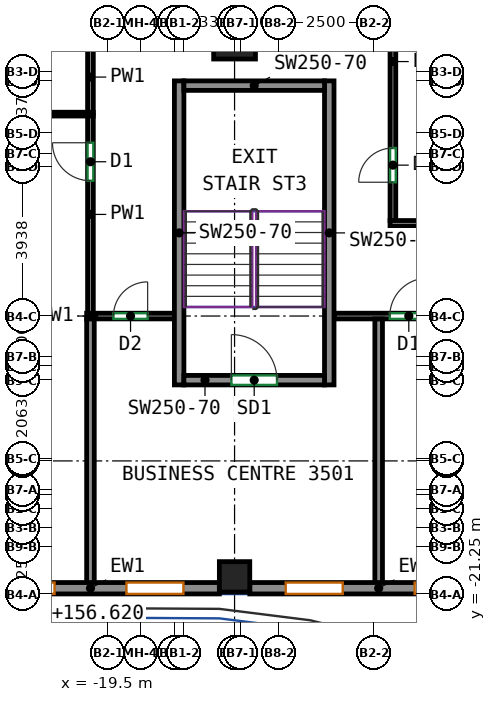
"""IFC4 building model, lengths in metres.
Left out: names, types, materials, properties, quantities, classifications, styles, units other than length and angle.
Written with IfcOpenShell. Run it as: python <this file> out.ifc"""

import sys

from ifc_helpers import new_model, si_unit, direction, frame, frame_2d, origin, origin_2d, place, context, subcontext, project, spatial, rectangle, extrude, source, transform, mapped, element, fill, save


model = new_model("IFC4")
c1 = context("Model", 3, precision=1e-05, world=origin(), true_north=direction((0.0, 1.0)))
c2 = subcontext(c1, "Body", "Model", "MODEL_VIEW")
j1 = project(units=[si_unit("LENGTHUNIT", "METRE"), si_unit("PLANEANGLEUNIT", "RADIAN")], contexts=[c1])
p1 = place(None, origin())
s1 = spatial("IfcSite", under=j1, at=p1, CompositionType="ELEMENT")
p2 = place(p1, origin())
s2 = spatial("IfcBuilding", under=s1, at=p2, CompositionType="ELEMENT")
p3 = place(p2, frame((0.0, 0.0, 154.1)))
s3 = spatial("IfcBuildingStorey", under=s2, at=p3, CompositionType="ELEMENT", Elevation=154.1)
m1 = source(origin(), c2, "Body", "SweptSolid", [
    extrude(rectangle(XDim=0.8, YDim=0.8, at=origin_2d()), origin(), (0.0, 0.0, 1.0), 3.12),
])
p4 = place(p3, frame((-16.167, -20.8, 0.0), z_axis=(0.0, 0.0, 1.0), x_axis=(1.0, 0.0, 0.0)))
e1 = element("IfcColumn", 1, at=p4, inside=s3, PredefinedType="COLUMN", context=c2, shape_type="MappedRepresentation", body=[
    mapped(m1, transform((0.0, 0.0, 0.0))),
])
m2 = source(origin(), c2, "Body", "SweptSolid", [
    extrude(rectangle(XDim=1.1, YDim=1.1, at=origin_2d()), origin(), (0.0, 0.0, 1.0), 3.12),
])
p5 = place(p3, frame((-16.167, -6.625, 0.0), z_axis=(0.0, 0.0, 1.0), x_axis=(1.0, 0.0, 0.0)))
e2 = element("IfcColumn", 2, at=p5, inside=s3, PredefinedType="COLUMN", context=c2, shape_type="MappedRepresentation", body=[
    mapped(m2, transform((0.0, 0.0, 0.0))),
])
m3 = source(origin(), c2, "Body", "SweptSolid", [
    extrude(rectangle(XDim=8.0, YDim=0.25, at=frame_2d((4.0, 0.0))), origin(), (0.0, 0.0, 1.0), 3.12),
])
for number, where, z_axis, x_axis in (
    (3, (-17.625, -15.75, 0.0), (0.0, 0.0, 1.0), (0.0, 1.0, 0.0)),
    (4, (-13.675, -15.75, 0.0), (0.0, 0.0, 1.0), (0.0, 1.0, 0.0)),
):
    element("IfcWall", number, at=place(p3, frame(where, z_axis=z_axis, x_axis=x_axis)), inside=s3, PredefinedType="SHEAR", context=c2, shape_type="MappedRepresentation", body=[
        mapped(m3, transform((0.0, 0.0, 0.0))),
    ])
m4 = source(origin(), c2, "Body", "SweptSolid", [
    extrude(rectangle(XDim=3.7, YDim=0.25, at=frame_2d((1.85, 0.0))), origin(), (0.0, 0.0, 1.0), 3.12),
])
p6 = place(p3, frame((-17.5, -15.625, 0.0), z_axis=(0.0, 0.0, 1.0), x_axis=(1.0, 0.0, 0.0)))
e5 = element("IfcWall", 5, at=p6, inside=s3, PredefinedType="SHEAR", context=c2, shape_type="MappedRepresentation", body=[
    mapped(m4, transform((0.0, 0.0, 0.0))),
])
p7 = place(p6, frame((1.25, 0.0, 0.0)))
e6 = element("IfcOpeningElement", 6, at=p7, cuts=e5, PredefinedType="OPENING", context=c2, shape_type="SweptSolid", body=[
    extrude(rectangle(XDim=1.2, YDim=2.1, at=frame_2d((0.6, 1.05))), frame((0.0, 0.135, 0.0), z_axis=(0.0, -1.0, 0.0), x_axis=(1.0, 0.0, 0.0)), (0.0, 0.0, 1.0), 0.27),
])
p8 = place(p3, frame((-17.5, -7.875, 0.0), z_axis=(0.0, 0.0, 1.0), x_axis=(1.0, 0.0, 0.0)))
e7 = element("IfcWall", 7, at=p8, inside=s3, PredefinedType="SHEAR", context=c2, shape_type="MappedRepresentation", body=[
    mapped(m4, transform((0.0, 0.0, 0.0))),
])
m5 = source(origin(), c2, "Body", "SweptSolid", [
    extrude(rectangle(XDim=6.783, YDim=0.3, at=frame_2d((3.392, 0.0))), origin(), (0.0, 0.0, 1.0), 3.12),
])
p9 = place(p3, frame((-23.35, -21.1, 0.0), z_axis=(0.0, 0.0, 1.0), x_axis=(1.0, 0.0, 0.0)))
e8 = element("IfcWall", 8, at=p9, inside=s3, PredefinedType="SOLIDWALL", context=c2, shape_type="MappedRepresentation", body=[
    mapped(m5, transform((0.0, 0.0, 0.0))),
])
p10 = place(p9, frame((0.946, 0.0, 0.85)))
e9 = element("IfcOpeningElement", 9, at=p10, cuts=e8, PredefinedType="OPENING", context=c2, shape_type="SweptSolid", body=[
    extrude(rectangle(XDim=1.5, YDim=1.95, at=frame_2d((0.75, 0.975))), frame((0.0, 0.16, 0.0), z_axis=(0.0, -1.0, 0.0), x_axis=(1.0, 0.0, 0.0)), (0.0, 0.0, 1.0), 0.32),
])
p11 = place(p9, frame((4.337, 0.0, 0.85)))
e10 = element("IfcOpeningElement", 10, at=p11, cuts=e8, PredefinedType="OPENING", context=c2, shape_type="SweptSolid", body=[
    extrude(rectangle(XDim=1.5, YDim=1.95, at=frame_2d((0.75, 0.975))), frame((0.0, 0.16, 0.0), z_axis=(0.0, -1.0, 0.0), x_axis=(1.0, 0.0, 0.0)), (0.0, 0.0, 1.0), 0.32),
])
m6 = source(origin(), c2, "Body", "SweptSolid", [
    extrude(rectangle(XDim=6.783, YDim=0.3, at=frame_2d((3.392, 0.0))), origin(), (0.0, 0.0, 1.0), 3.12),
])
p12 = place(p3, frame((-15.767, -21.1, 0.0), z_axis=(0.0, 0.0, 1.0), x_axis=(1.0, 0.0, 0.0)))
e11 = element("IfcWall", 11, at=p12, inside=s3, PredefinedType="SOLIDWALL", context=c2, shape_type="MappedRepresentation", body=[
    mapped(m6, transform((0.0, 0.0, 0.0))),
])
p13 = place(p12, frame((0.946, 0.0, 0.85)))
e12 = element("IfcOpeningElement", 12, at=p13, cuts=e11, PredefinedType="OPENING", context=c2, shape_type="SweptSolid", body=[
    extrude(rectangle(XDim=1.5, YDim=1.95, at=frame_2d((0.75, 0.975))), frame((0.0, 0.16, 0.0), z_axis=(0.0, -1.0, 0.0), x_axis=(1.0, 0.0, 0.0)), (0.0, 0.0, 1.0), 0.32),
])
p14 = place(p12, frame((4.338, 0.0, 0.85)))
e13 = element("IfcOpeningElement", 13, at=p14, cuts=e11, PredefinedType="OPENING", context=c2, shape_type="SweptSolid", body=[
    extrude(rectangle(XDim=1.5, YDim=1.95, at=frame_2d((0.75, 0.975))), frame((0.0, 0.16, 0.0), z_axis=(0.0, -1.0, 0.0), x_axis=(1.0, 0.0, 0.0)), (0.0, 0.0, 1.0), 0.32),
])
p15 = place(p3, frame((-13.55, -13.938, 0.0), z_axis=(0.0, 0.0, 1.0), x_axis=(1.0, 0.0, 0.0)))
e14 = element("IfcWall", 14, at=p15, inside=s3, PredefinedType="PARTITIONING", context=c2, shape_type="SweptSolid", body=[
    extrude(rectangle(XDim=4.417, YDim=0.15, at=frame_2d((2.208, 0.0))), origin(), (0.0, 0.0, 1.0), 3.12),
])
p16 = place(p15, frame((1.468, 0.0, 0.0)))
e15 = element("IfcOpeningElement", 15, at=p16, cuts=e14, PredefinedType="OPENING", context=c2, shape_type="SweptSolid", body=[
    extrude(rectangle(XDim=1.0, YDim=2.1, at=frame_2d((0.5, 1.05))), frame((0.0, 0.085, 0.0), z_axis=(0.0, -1.0, 0.0), x_axis=(1.0, 0.0, 0.0)), (0.0, 0.0, 1.0), 0.17),
])
p17 = place(p3, frame((-20.059, -13.938, 0.0), z_axis=(0.0, 0.0, 1.0), x_axis=(1.0, 0.0, 0.0)))
e16 = element("IfcWall", 16, at=p17, inside=s3, PredefinedType="PARTITIONING", context=c2, shape_type="SweptSolid", body=[
    extrude(rectangle(XDim=2.309, YDim=0.15, at=frame_2d((1.155, 0.0))), origin(), (0.0, 0.0, 1.0), 3.12),
])
p18 = place(p17, frame((0.705, 0.0, 0.0)))
e17 = element("IfcOpeningElement", 17, at=p18, cuts=e16, PredefinedType="OPENING", context=c2, shape_type="SweptSolid", body=[
    extrude(rectangle(XDim=0.9, YDim=2.1, at=frame_2d((0.45, 1.05))), frame((0.0, 0.085, 0.0), z_axis=(0.0, -1.0, 0.0), x_axis=(1.0, 0.0, 0.0)), (0.0, 0.0, 1.0), 0.17),
])
p19 = place(p3, frame((-19.959, -13.863, 0.0), z_axis=(0.0, 0.0, 1.0), x_axis=(0.0, 1.0, 0.0)))
e18 = element("IfcWall", 18, at=p19, inside=s3, PredefinedType="PARTITIONING", context=c2, shape_type="SweptSolid", body=[
    extrude(rectangle(XDim=5.198, YDim=0.15, at=frame_2d((2.599, 0.0))), origin(), (0.0, 0.0, 1.0), 3.12),
])
p20 = place(p19, frame((3.485, 0.0, 0.0)))
e19 = element("IfcOpeningElement", 19, at=p20, cuts=e18, PredefinedType="OPENING", context=c2, shape_type="SweptSolid", body=[
    extrude(rectangle(XDim=1.0, YDim=2.1, at=frame_2d((0.5, 1.05))), frame((0.0, 0.085, 0.0), z_axis=(0.0, -1.0, 0.0), x_axis=(1.0, 0.0, 0.0)), (0.0, 0.0, 1.0), 0.17),
])
p21 = place(p3, frame((-19.959, -8.585, 0.0), z_axis=(0.0, 0.0, 1.0), x_axis=(0.0, 1.0, 0.0)))
e20 = element("IfcWall", 20, at=p21, inside=s3, PredefinedType="PARTITIONING", context=c2, shape_type="SweptSolid", body=[
    extrude(rectangle(XDim=1.87, YDim=0.15, at=frame_2d((0.935, 0.0))), origin(), (0.0, 0.0, 1.0), 3.12),
])
p22 = place(p3, frame((-12.0, -11.425, 0.0), z_axis=(0.0, 0.0, 1.0), x_axis=(0.0, 1.0, 0.0)))
e21 = element("IfcWall", 21, at=p22, inside=s3, PredefinedType="PARTITIONING", context=c2, shape_type="SweptSolid", body=[
    extrude(rectangle(XDim=8.366, YDim=0.15, at=frame_2d((4.183, 0.0))), origin(), (0.0, 0.0, 1.0), 3.12),
])
p23 = place(p22, frame((1.008, 0.0, 0.0)))
e22 = element("IfcOpeningElement", 22, at=p23, cuts=e21, PredefinedType="OPENING", context=c2, shape_type="SweptSolid", body=[
    extrude(rectangle(XDim=0.9, YDim=2.1, at=frame_2d((0.45, 1.05))), frame((0.0, 0.085, 0.0), z_axis=(0.0, -1.0, 0.0), x_axis=(1.0, 0.0, 0.0)), (0.0, 0.0, 1.0), 0.17),
])
p24 = place(p3, frame((-12.075, -11.5, 0.0), z_axis=(0.0, 0.0, 1.0), x_axis=(1.0, 0.0, 0.0)))
e23 = element("IfcWall", 23, at=p24, inside=s3, PredefinedType="PARTITIONING", context=c2, shape_type="SweptSolid", body=[
    extrude(rectangle(XDim=28.35, YDim=0.15, at=frame_2d((14.175, 0.0))), origin(), (0.0, 0.0, 1.0), 3.12),
])
p25 = place(p24, frame((18.584, 0.0, 0.0)))
e24 = element("IfcOpeningElement", 24, at=p25, cuts=e23, PredefinedType="OPENING", context=c2, shape_type="SweptSolid", body=[
    extrude(rectangle(XDim=0.9, YDim=2.1, at=frame_2d((0.45, 1.05))), frame((0.0, 0.085, 0.0), z_axis=(0.0, -1.0, 0.0), x_axis=(1.0, 0.0, 0.0)), (0.0, 0.0, 1.0), 0.17),
])
for number, where, z_axis, x_axis in (
    (25, (-12.375, -21.0, 0.0), (0.0, 0.0, 1.0), (0.0, 1.0, 0.0)),
    (26, (-19.959, -21.0, 0.0), (0.0, 0.0, 1.0), (0.0, 1.0, 0.0)),
):
    element("IfcWall", number, at=place(p3, frame(where, z_axis=z_axis, x_axis=x_axis)), inside=s3, PredefinedType="PARTITIONING", context=c2, shape_type="SweptSolid", body=[
        extrude(rectangle(XDim=6.985, YDim=0.2, at=frame_2d((3.493, 0.0))), origin(), (0.0, 0.0, 1.0), 3.12),
    ])
p26 = place(p3, frame((-19.886, -8.625, 0.0), z_axis=(0.0, 0.0, 1.0), x_axis=(-1.0, 0.0, 0.0)))
e27 = element("IfcWall", 27, at=p26, inside=s3, PredefinedType="PARTITIONING", context=c2, shape_type="SweptSolid", body=[
    extrude(rectangle(XDim=2.823, YDim=0.1, at=frame_2d((1.412, 0.0))), origin(), (0.0, 0.0, 1.0), 3.12),
])
p27 = place(p26, frame((1.418, 0.0, 0.0)))
e28 = element("IfcOpeningElement", 28, at=p27, cuts=e27, PredefinedType="OPENING", context=c2, shape_type="SweptSolid", body=[
    extrude(rectangle(XDim=0.9, YDim=2.1, at=frame_2d((0.45, 1.05))), frame((0.0, 0.06, 0.0), z_axis=(0.0, -1.0, 0.0), x_axis=(1.0, 0.0, 0.0)), (0.0, 0.0, 1.0), 0.12),
])
p28 = place(p10, origin())
e29 = element("IfcWindow", 29, at=p28, inside=s3, PartitioningType="SINGLE_PANEL", PredefinedType="WINDOW", context=c2, shape_type="SweptSolid", body=[
    extrude(rectangle(XDim=1.5, YDim=1.95, at=frame_2d((0.75, 0.975))), frame((0.0, 0.03, 0.0), z_axis=(0.0, -1.0, 0.0), x_axis=(1.0, 0.0, 0.0)), (0.0, 0.0, 1.0), 0.06),
])
fill(e9, e29)
p29 = place(p11, origin())
e30 = element("IfcWindow", 30, at=p29, inside=s3, PartitioningType="SINGLE_PANEL", PredefinedType="WINDOW", context=c2, shape_type="SweptSolid", body=[
    extrude(rectangle(XDim=1.5, YDim=1.95, at=frame_2d((0.75, 0.975))), frame((0.0, 0.03, 0.0), z_axis=(0.0, -1.0, 0.0), x_axis=(1.0, 0.0, 0.0)), (0.0, 0.0, 1.0), 0.06),
])
fill(e10, e30)
p30 = place(p13, origin())
e31 = element("IfcWindow", 31, at=p30, inside=s3, PartitioningType="SINGLE_PANEL", PredefinedType="WINDOW", context=c2, shape_type="SweptSolid", body=[
    extrude(rectangle(XDim=1.5, YDim=1.95, at=frame_2d((0.75, 0.975))), frame((0.0, 0.03, 0.0), z_axis=(0.0, -1.0, 0.0), x_axis=(1.0, 0.0, 0.0)), (0.0, 0.0, 1.0), 0.06),
])
fill(e12, e31)
p31 = place(p14, origin())
e32 = element("IfcWindow", 32, at=p31, inside=s3, PartitioningType="SINGLE_PANEL", PredefinedType="WINDOW", context=c2, shape_type="SweptSolid", body=[
    extrude(rectangle(XDim=1.5, YDim=1.95, at=frame_2d((0.75, 0.975))), frame((0.0, 0.03, 0.0), z_axis=(0.0, -1.0, 0.0), x_axis=(1.0, 0.0, 0.0)), (0.0, 0.0, 1.0), 0.06),
])
fill(e13, e32)
p32 = place(p7, origin())
e33 = element("IfcDoor", 33, at=p32, inside=s3, OperationType="DOUBLE_DOOR_SINGLE_SWING", PredefinedType="DOOR", context=c2, shape_type="SweptSolid", body=[
    extrude(rectangle(XDim=1.2, YDim=2.1, at=frame_2d((0.6, 1.05))), frame((0.0, 0.025, 0.0), z_axis=(0.0, -1.0, 0.0), x_axis=(1.0, 0.0, 0.0)), (0.0, 0.0, 1.0), 0.05),
])
fill(e6, e33)
p33 = place(p18, origin())
e34 = element("IfcDoor", 34, at=p33, inside=s3, OperationType="SINGLE_SWING_RIGHT", PredefinedType="DOOR", context=c2, shape_type="SweptSolid", body=[
    extrude(rectangle(XDim=0.9, YDim=2.1, at=frame_2d((0.45, 1.05))), frame((0.0, 0.025, 0.0), z_axis=(0.0, -1.0, 0.0), x_axis=(1.0, 0.0, 0.0)), (0.0, 0.0, 1.0), 0.05),
])
fill(e17, e34)
p34 = place(p16, origin())
e35 = element("IfcDoor", 35, at=p34, inside=s3, OperationType="SINGLE_SWING_RIGHT", PredefinedType="DOOR", context=c2, shape_type="SweptSolid", body=[
    extrude(rectangle(XDim=1.0, YDim=2.1, at=frame_2d((0.5, 1.05))), frame((0.0, 0.025, 0.0), z_axis=(0.0, -1.0, 0.0), x_axis=(1.0, 0.0, 0.0)), (0.0, 0.0, 1.0), 0.05),
])
fill(e15, e35)
p35 = place(p23, origin())
e36 = element("IfcDoor", 36, at=p35, inside=s3, OperationType="SINGLE_SWING_LEFT", PredefinedType="DOOR", context=c2, shape_type="SweptSolid", body=[
    extrude(rectangle(XDim=0.9, YDim=2.1, at=frame_2d((0.45, 1.05))), frame((0.0, 0.025, 0.0), z_axis=(0.0, -1.0, 0.0), x_axis=(1.0, 0.0, 0.0)), (0.0, 0.0, 1.0), 0.05),
])
fill(e22, e36)
p36 = place(p20, origin())
e37 = element("IfcDoor", 37, at=p36, inside=s3, OperationType="SINGLE_SWING_RIGHT", PredefinedType="DOOR", context=c2, shape_type="SweptSolid", body=[
    extrude(rectangle(XDim=1.0, YDim=2.1, at=frame_2d((0.5, 1.05))), frame((0.0, 0.025, 0.0), z_axis=(0.0, -1.0, 0.0), x_axis=(1.0, 0.0, 0.0)), (0.0, 0.0, 1.0), 0.05),
])
fill(e19, e37)
save(model, sys.argv[1])
